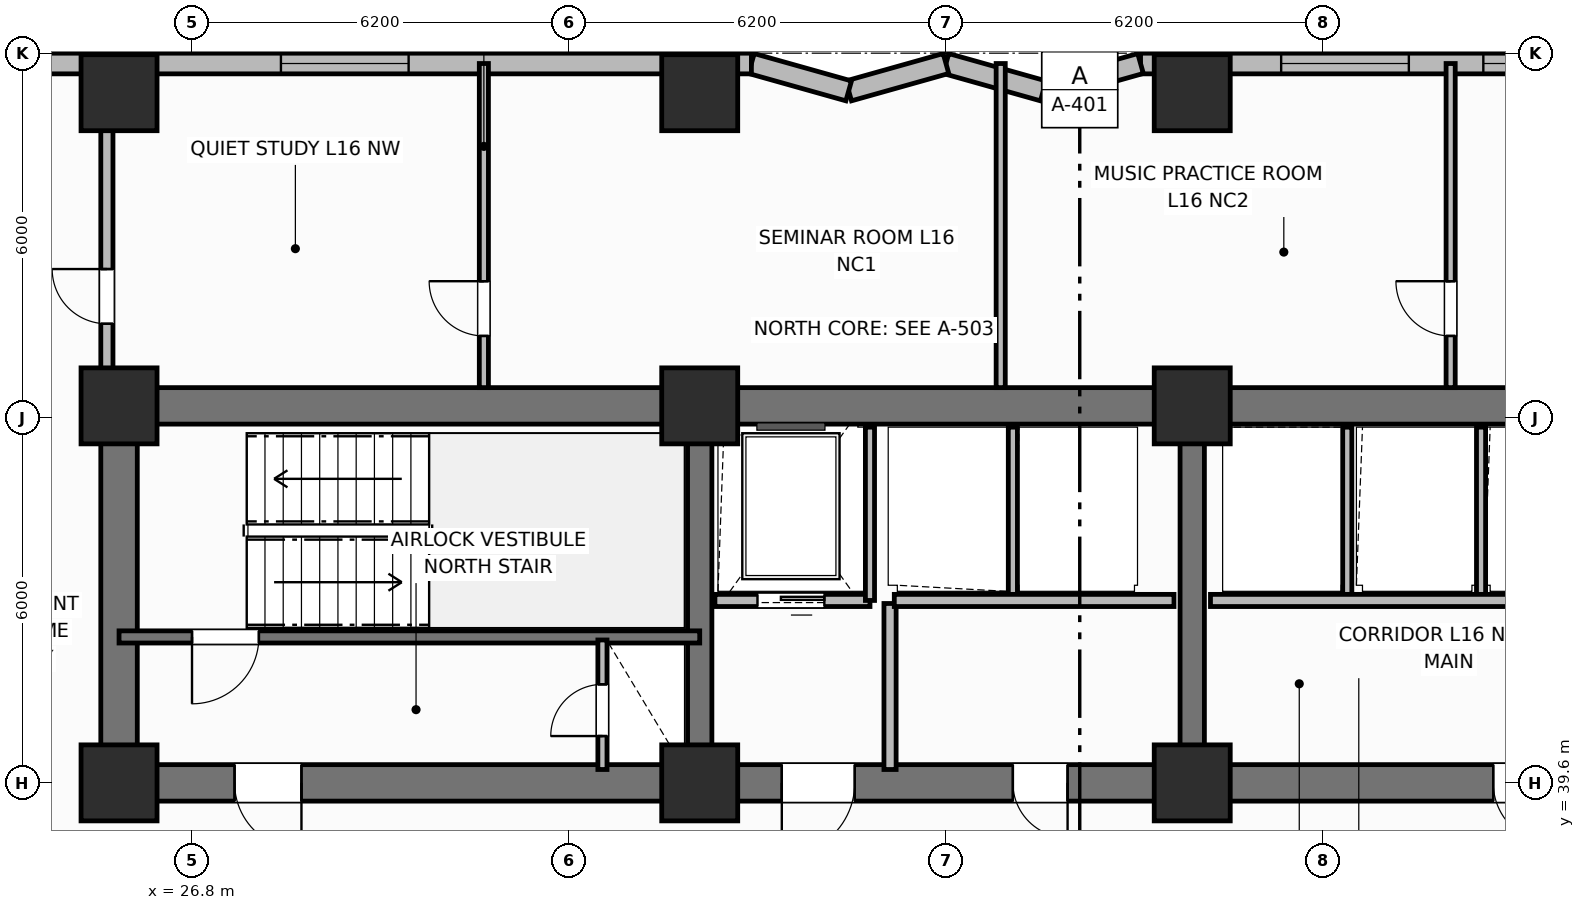
"""IFC4 building model, lengths in metres.
Left out: names, types, materials, properties, quantities, classifications, styles, units other than length and angle.
Written with IfcOpenShell. Run it as: python <this file> out.ifc"""

import sys

from ifc_helpers import new_model, si_unit, direction, frame, frame_2d, origin, origin_2d, place, context, subcontext, project, spatial, rectangle, extrude, element, fill, save


model = new_model("IFC4")
c1 = context("Model", 3, precision=1e-05, world=origin(), true_north=direction((0.0, 1.0)))
c2 = subcontext(c1, "Body", "Model", "MODEL_VIEW")
j1 = project(units=[si_unit("LENGTHUNIT", "METRE"), si_unit("PLANEANGLEUNIT", "RADIAN")], contexts=[c1])
p1 = place(None, origin())
s1 = spatial("IfcSite", under=j1, at=p1, CompositionType="ELEMENT")
p2 = place(p1, origin())
s2 = spatial("IfcBuilding", under=s1, at=p2, CompositionType="ELEMENT")
p3 = place(p2, frame((0.0, 0.0, 65.8)))
s3 = spatial("IfcBuildingStorey", under=s2, at=p3, CompositionType="ELEMENT", Elevation=65.8)
p4 = place(p3, frame((25.6, 45.8, 0.0), z_axis=(0.0, 0.0, 1.0), x_axis=(1.0, 0.0, 0.0)))
e1 = element("IfcWall", 1, at=p4, inside=s3, PredefinedType="SHEAR", context=c2, shape_type="SweptSolid", body=[
    extrude(rectangle(XDim=27.2, YDim=0.6, at=frame_2d((13.6, 0.0))), origin(), (0.0, 0.0, 1.0), 3.7),
])
p5 = place(p3, frame((25.6, 39.9, 0.0), z_axis=(0.0, 0.0, 1.0), x_axis=(0.0, 1.0, 0.0)))
e2 = element("IfcWall", 2, at=p5, inside=s3, PredefinedType="SHEAR", context=c2, shape_type="SweptSolid", body=[
    extrude(rectangle(XDim=5.6, YDim=0.6, at=frame_2d((2.8, 0.0))), origin(), (0.0, 0.0, 1.0), 3.7),
])
p6 = place(p3, frame((52.8, 39.6, 0.0), z_axis=(0.0, 0.0, 1.0), x_axis=(-1.0, 0.0, 0.0)))
e3 = element("IfcWall", 3, at=p6, inside=s3, PredefinedType="SHEAR", context=c2, shape_type="SweptSolid", body=[
    extrude(rectangle(XDim=27.2, YDim=0.6, at=frame_2d((13.6, 0.0))), origin(), (0.0, 0.0, 1.0), 3.7),
])
p7 = place(p6, frame((24.2, 0.0, 0.0)))
e4 = element("IfcOpeningElement", 4, at=p7, cuts=e3, PredefinedType="OPENING", context=c2, shape_type="SweptSolid", body=[
    extrude(rectangle(XDim=1.1, YDim=2.15, at=frame_2d((0.55, 1.075))), frame((0.0, 0.31, 0.0), z_axis=(0.0, -1.0, 0.0), x_axis=(1.0, 0.0, 0.0)), (0.0, 0.0, 1.0), 0.62),
])
p8 = place(p6, frame((15.1, 0.0, 0.0)))
e5 = element("IfcOpeningElement", 5, at=p8, cuts=e3, PredefinedType="OPENING", context=c2, shape_type="SweptSolid", body=[
    extrude(rectangle(XDim=1.2, YDim=2.15, at=frame_2d((0.6, 1.075))), frame((0.0, 0.31, 0.0), z_axis=(0.0, -1.0, 0.0), x_axis=(1.0, 0.0, 0.0)), (0.0, 0.0, 1.0), 0.62),
])
p9 = place(p6, frame((11.6, 0.0, 0.0)))
e6 = element("IfcOpeningElement", 6, at=p9, cuts=e3, PredefinedType="OPENING", context=c2, shape_type="SweptSolid", body=[
    extrude(rectangle(XDim=0.9, YDim=2.1, at=frame_2d((0.45, 1.05))), frame((0.0, 0.31, 0.0), z_axis=(0.0, -1.0, 0.0), x_axis=(1.0, 0.0, 0.0)), (0.0, 0.0, 1.0), 0.62),
])
p10 = place(p6, frame((3.6, 0.0, 0.0)))
e7 = element("IfcOpeningElement", 7, at=p10, cuts=e3, PredefinedType="OPENING", context=c2, shape_type="SweptSolid", body=[
    extrude(rectangle(XDim=1.0, YDim=2.15, at=frame_2d((0.5, 1.075))), frame((0.0, 0.31, 0.0), z_axis=(0.0, -1.0, 0.0), x_axis=(1.0, 0.0, 0.0)), (0.0, 0.0, 1.0), 0.62),
])
for number, where, z_axis, x_axis in (
    (8, (35.15, 39.9, 0.0), (0.0, 0.0, 1.0), (0.0, 1.0, 0.0)),
    (9, (43.25, 39.9, 0.0), (0.0, 0.0, 1.0), (0.0, 1.0, 0.0)),
):
    element("IfcWall", number, at=place(p3, frame(where, z_axis=z_axis, x_axis=x_axis)), inside=s3, PredefinedType="SHEAR", context=c2, shape_type="SweptSolid", body=[
        extrude(rectangle(XDim=5.6, YDim=0.4, at=frame_2d((2.8, 0.0))), origin(), (0.0, 0.0, 1.0), 3.7),
    ])
for number, where, z_axis, x_axis in (
    (10, (25.6, 39.6, 0.0), (0.0, 0.0, 1.0), (1.0, 0.0, 0.0)),
    (11, (25.6, 45.8, 0.0), (0.0, 0.0, 1.0), (1.0, 0.0, 0.0)),
    (12, (35.15, 39.6, 0.0), (0.0, 0.0, 1.0), (1.0, 0.0, 0.0)),
    (13, (35.15, 45.8, 0.0), (0.0, 0.0, 1.0), (1.0, 0.0, 0.0)),
    (14, (43.25, 39.6, 0.0), (0.0, 0.0, 1.0), (1.0, 0.0, 0.0)),
    (15, (43.25, 45.8, 0.0), (0.0, 0.0, 1.0), (1.0, 0.0, 0.0)),
    (16, (25.6, 50.95, 0.0), (0.0, 0.0, 1.0), (1.0, 0.0, 0.0)),
    (17, (35.15, 50.95, 0.0), (0.0, 0.0, 1.0), (1.0, 0.0, 0.0)),
    (18, (43.25, 50.95, 0.0), (0.0, 0.0, 1.0), (1.0, 0.0, 0.0)),
):
    element("IfcColumn", number, at=place(p3, frame(where, z_axis=z_axis, x_axis=x_axis)), inside=s3, PredefinedType="COLUMN", context=c2, shape_type="SweptSolid", body=[
        extrude(rectangle(XDim=1.25, YDim=1.25, at=origin_2d()), origin(), (0.0, 0.0, 1.0), 3.7),
    ])
p11 = place(p3, frame((59.8, 51.43, 0.0), z_axis=(0.0, 0.0, 1.0), x_axis=(-1.0, 0.0, 0.0)))
e19 = element("IfcWall", 19, at=p11, inside=s3, PredefinedType="SOLIDWALL", context=c2, shape_type="SweptSolid", body=[
    extrude(rectangle(XDim=17.4, YDim=0.34, at=frame_2d((8.7, 0.0))), origin(), (0.0, 0.0, 1.0), 2.7),
])
p12 = place(p11, frame((1.613, 0.0, 0.68)))
e20 = element("IfcOpeningElement", 20, at=p12, cuts=e19, PredefinedType="OPENING", context=c2, shape_type="SweptSolid", body=[
    extrude(rectangle(XDim=2.1, YDim=1.9, at=frame_2d((1.05, 0.95))), frame((0.0, 0.18, 0.0), z_axis=(0.0, -1.0, 0.0), x_axis=(1.0, 0.0, 0.0)), (0.0, 0.0, 1.0), 0.36),
])
p13 = place(p11, frame((9.663, 0.0, 0.68)))
e21 = element("IfcOpeningElement", 21, at=p13, cuts=e19, PredefinedType="OPENING", context=c2, shape_type="SweptSolid", body=[
    extrude(rectangle(XDim=2.1, YDim=1.9, at=frame_2d((1.05, 0.95))), frame((0.0, 0.18, 0.0), z_axis=(0.0, -1.0, 0.0), x_axis=(1.0, 0.0, 0.0)), (0.0, 0.0, 1.0), 0.36),
])
p14 = place(p11, frame((12.988, 0.0, 0.68)))
e22 = element("IfcOpeningElement", 22, at=p14, cuts=e19, PredefinedType="OPENING", context=c2, shape_type="SweptSolid", body=[
    extrude(rectangle(XDim=2.1, YDim=1.9, at=frame_2d((1.05, 0.95))), frame((0.0, 0.18, 0.0), z_axis=(0.0, -1.0, 0.0), x_axis=(1.0, 0.0, 0.0)), (0.0, 0.0, 1.0), 0.36),
])
p15 = place(p3, frame((42.4, 51.43, 0.0), z_axis=(0.0, 0.0, 1.0), x_axis=(-0.962652136636, -0.270741322725, 0.0)))
e23 = element("IfcWall", 23, at=p15, inside=s3, PredefinedType="SOLIDWALL", context=c2, shape_type="SweptSolid", body=[
    extrude(rectangle(XDim=1.662, YDim=0.34, at=frame_2d((0.831, 0.0))), origin(), (0.0, 0.0, 1.0), 2.7),
])
p16 = place(p3, frame((40.8, 50.98, 0.0), z_axis=(0.0, 0.0, 1.0), x_axis=(-0.962662902433, 0.270703040766, 0.0)))
e24 = element("IfcWall", 24, at=p16, inside=s3, PredefinedType="SOLIDWALL", context=c2, shape_type="SweptSolid", body=[
    extrude(rectangle(XDim=1.662, YDim=0.34, at=frame_2d((0.831, 0.0))), origin(), (0.0, 0.0, 1.0), 2.7),
])
p17 = place(p3, frame((39.2, 51.43, 0.0), z_axis=(0.0, 0.0, 1.0), x_axis=(-0.962652136636, -0.270741322725, 0.0)))
e25 = element("IfcWall", 25, at=p17, inside=s3, PredefinedType="SOLIDWALL", context=c2, shape_type="SweptSolid", body=[
    extrude(rectangle(XDim=1.662, YDim=0.34, at=frame_2d((0.831, 0.0))), origin(), (0.0, 0.0, 1.0), 2.7),
])
p18 = place(p3, frame((37.6, 50.98, 0.0), z_axis=(0.0, 0.0, 1.0), x_axis=(-0.962662902433, 0.270703040766, 0.0)))
e26 = element("IfcWall", 26, at=p18, inside=s3, PredefinedType="SOLIDWALL", context=c2, shape_type="SweptSolid", body=[
    extrude(rectangle(XDim=1.662, YDim=0.34, at=frame_2d((0.831, 0.0))), origin(), (0.0, 0.0, 1.0), 2.7),
])
p19 = place(p3, frame((36.0, 51.43, 0.0), z_axis=(0.0, 0.0, 1.0), x_axis=(-1.0, 0.0, 0.0)))
e27 = element("IfcWall", 27, at=p19, inside=s3, PredefinedType="SOLIDWALL", context=c2, shape_type="SweptSolid", body=[
    extrude(rectangle(XDim=17.4, YDim=0.34, at=frame_2d((8.7, 0.0))), origin(), (0.0, 0.0, 1.0), 2.7),
])
p20 = place(p19, frame((5.637, 0.0, 0.68)))
e28 = element("IfcOpeningElement", 28, at=p20, cuts=e27, PredefinedType="OPENING", context=c2, shape_type="SweptSolid", body=[
    extrude(rectangle(XDim=2.1, YDim=1.9, at=frame_2d((1.05, 0.95))), frame((0.0, 0.18, 0.0), z_axis=(0.0, -1.0, 0.0), x_axis=(1.0, 0.0, 0.0)), (0.0, 0.0, 1.0), 0.36),
])
p21 = place(p19, frame((14.038, 0.0, 0.68)))
e29 = element("IfcOpeningElement", 29, at=p21, cuts=e27, PredefinedType="OPENING", context=c2, shape_type="SweptSolid", body=[
    extrude(rectangle(XDim=2.1, YDim=1.9, at=frame_2d((1.05, 0.95))), frame((0.0, 0.18, 0.0), z_axis=(0.0, -1.0, 0.0), x_axis=(1.0, 0.0, 0.0)), (0.0, 0.0, 1.0), 0.36),
])
p22 = place(p3, frame((35.15, 42.0, 0.0), z_axis=(0.0, 0.0, 1.0), x_axis=(-1.0, 0.0, 0.0)))
e30 = element("IfcWall", 30, at=p22, inside=s3, PredefinedType="SHEAR", context=c2, shape_type="SweptSolid", body=[
    extrude(rectangle(XDim=9.55, YDim=0.2, at=frame_2d((4.775, 0.0))), origin(), (0.0, 0.0, 1.0), 3.7),
])
p23 = place(p22, frame((7.25, 0.0, 0.0)))
e31 = element("IfcOpeningElement", 31, at=p23, cuts=e30, PredefinedType="OPENING", context=c2, shape_type="SweptSolid", body=[
    extrude(rectangle(XDim=1.1, YDim=2.15, at=frame_2d((0.55, 1.075))), frame((0.0, 0.11, 0.0), z_axis=(0.0, -1.0, 0.0), x_axis=(1.0, 0.0, 0.0)), (0.0, 0.0, 1.0), 0.22),
])
p24 = place(p3, frame((33.55, 39.82, 0.0), z_axis=(0.0, 0.0, 1.0), x_axis=(0.0, 1.0, 0.0)))
e32 = element("IfcWall", 32, at=p24, inside=s3, PredefinedType="PARTITIONING", context=c2, shape_type="SweptSolid", body=[
    extrude(rectangle(XDim=2.13, YDim=0.15, at=frame_2d((1.065, 0.0))), origin(), (0.0, 0.0, 1.0), 2.53),
])
p25 = place(p24, frame((0.55, 0.0, 0.0)))
e33 = element("IfcOpeningElement", 33, at=p25, cuts=e32, PredefinedType="OPENING", context=c2, shape_type="SweptSolid", body=[
    extrude(rectangle(XDim=0.85, YDim=2.05, at=frame_2d((0.425, 1.025))), frame((0.0, 0.085, 0.0), z_axis=(0.0, -1.0, 0.0), x_axis=(1.0, 0.0, 0.0)), (0.0, 0.0, 1.0), 0.17),
])
p26 = place(p3, frame((37.95, 42.6, 0.0), z_axis=(0.0, 0.0, 1.0), x_axis=(-1.0, 0.0, 0.0)))
e34 = element("IfcWall", 34, at=p26, inside=s3, PredefinedType="PARTITIONING", context=c2, shape_type="SweptSolid", body=[
    extrude(rectangle(XDim=2.55, YDim=0.2, at=frame_2d((1.275, 0.0))), origin(), (0.0, 0.0, 1.0), 2.3),
])
p27 = place(p26, frame((0.75, 0.0, 0.0)))
e35 = element("IfcOpeningElement", 35, at=p27, cuts=e34, PredefinedType="OPENING", context=c2, shape_type="SweptSolid", body=[
    extrude(rectangle(XDim=1.1, YDim=2.15, at=frame_2d((0.55, 1.075))), frame((0.0, 0.11, 0.0), z_axis=(0.0, -1.0, 0.0), x_axis=(1.0, 0.0, 0.0)), (0.0, 0.0, 1.0), 0.22),
])
p28 = place(p3, frame((37.95, 42.6, 0.0), z_axis=(0.0, 0.0, 1.0), x_axis=(0.0, 1.0, 0.0)))
e36 = element("IfcWall", 36, at=p28, inside=s3, PredefinedType="PARTITIONING", context=c2, shape_type="SweptSolid", body=[
    extrude(rectangle(XDim=2.85, YDim=0.15, at=frame_2d((1.425, 0.0))), origin(), (0.0, 0.0, 1.0), 2.53),
])
p29 = place(p3, frame((38.28, 39.82, 0.0), z_axis=(0.0, 0.0, 1.0), x_axis=(0.0, 1.0, 0.0)))
e37 = element("IfcWall", 37, at=p29, inside=s3, PredefinedType="PARTITIONING", context=c2, shape_type="SweptSolid", body=[
    extrude(rectangle(XDim=2.73, YDim=0.2, at=frame_2d((1.365, 0.0))), origin(), (0.0, 0.0, 1.0), 2.53),
])
p30 = place(p3, frame((40.3, 42.65, 0.0), z_axis=(0.0, 0.0, 1.0), x_axis=(0.0, 1.0, 0.0)))
e38 = element("IfcWall", 38, at=p30, inside=s3, PredefinedType="PARTITIONING", context=c2, shape_type="SweptSolid", body=[
    extrude(rectangle(XDim=2.8, YDim=0.15, at=frame_2d((1.4, 0.0))), origin(), (0.0, 0.0, 1.0), 2.53),
])
p31 = place(p3, frame((42.95, 42.6, 0.0), z_axis=(0.0, 0.0, 1.0), x_axis=(-1.0, 0.0, 0.0)))
e39 = element("IfcWall", 39, at=p31, inside=s3, PredefinedType="PARTITIONING", context=c2, shape_type="SweptSolid", body=[
    extrude(rectangle(XDim=4.6, YDim=0.2, at=frame_2d((2.3, 0.0))), origin(), (0.0, 0.0, 1.0), 2.3),
])
for number, where, z_axis, x_axis in (
    (40, (45.8, 42.65, 0.0), (0.0, 0.0, 1.0), (0.0, 1.0, 0.0)),
    (41, (48.0, 42.65, 0.0), (0.0, 0.0, 1.0), (0.0, 1.0, 0.0)),
):
    element("IfcWall", number, at=place(p3, frame(where, z_axis=z_axis, x_axis=x_axis)), inside=s3, PredefinedType="PARTITIONING", context=c2, shape_type="SweptSolid", body=[
        extrude(rectangle(XDim=2.8, YDim=0.15, at=frame_2d((1.4, 0.0))), origin(), (0.0, 0.0, 1.0), 2.53),
    ])
p32 = place(p3, frame((52.35, 42.6, 0.0), z_axis=(0.0, 0.0, 1.0), x_axis=(-1.0, 0.0, 0.0)))
e42 = element("IfcWall", 42, at=p32, inside=s3, PredefinedType="PARTITIONING", context=c2, shape_type="SweptSolid", body=[
    extrude(rectangle(XDim=8.8, YDim=0.2, at=frame_2d((4.4, 0.0))), origin(), (0.0, 0.0, 1.0), 2.53),
])
p33 = place(p3, frame((31.6, 46.1, 0.0), z_axis=(0.0, 0.0, 1.0), x_axis=(0.0, 1.0, 0.0)))
e43 = element("IfcWall", 43, at=p33, inside=s3, PredefinedType="PARTITIONING", context=c2, shape_type="SweptSolid", body=[
    extrude(rectangle(XDim=5.33, YDim=0.15, at=frame_2d((2.665, 0.0))), origin(), (0.0, 0.0, 1.0), 2.53),
])
p34 = place(p33, frame((0.85, 0.0, 0.0)))
e44 = element("IfcOpeningElement", 44, at=p34, cuts=e43, PredefinedType="OPENING", context=c2, shape_type="SweptSolid", body=[
    extrude(rectangle(XDim=0.9, YDim=2.1, at=frame_2d((0.45, 1.05))), frame((0.0, 0.085, 0.0), z_axis=(0.0, -1.0, 0.0), x_axis=(1.0, 0.0, 0.0)), (0.0, 0.0, 1.0), 0.17),
])
p35 = place(p3, frame((40.1, 46.1, 0.0), z_axis=(0.0, 0.0, 1.0), x_axis=(0.0, 1.0, 0.0)))
e45 = element("IfcWall", 45, at=p35, inside=s3, PredefinedType="PARTITIONING", context=c2, shape_type="SweptSolid", body=[
    extrude(rectangle(XDim=5.33, YDim=0.15, at=frame_2d((2.665, 0.0))), origin(), (0.0, 0.0, 1.0), 2.53),
])
p36 = place(p3, frame((47.5, 46.1, 0.0), z_axis=(0.0, 0.0, 1.0), x_axis=(0.0, 1.0, 0.0)))
e46 = element("IfcWall", 46, at=p36, inside=s3, PredefinedType="PARTITIONING", context=c2, shape_type="SweptSolid", body=[
    extrude(rectangle(XDim=5.33, YDim=0.15, at=frame_2d((2.665, 0.0))), origin(), (0.0, 0.0, 1.0), 2.53),
])
p37 = place(p36, frame((0.85, 0.0, 0.0)))
e47 = element("IfcOpeningElement", 47, at=p37, cuts=e46, PredefinedType="OPENING", context=c2, shape_type="SweptSolid", body=[
    extrude(rectangle(XDim=0.9, YDim=2.1, at=frame_2d((0.45, 1.05))), frame((0.0, 0.085, 0.0), z_axis=(0.0, -1.0, 0.0), x_axis=(1.0, 0.0, 0.0)), (0.0, 0.0, 1.0), 0.17),
])
p38 = place(p3, frame((25.4, 46.1, 0.0), z_axis=(0.0, 0.0, 1.0), x_axis=(0.0, 1.0, 0.0)))
e48 = element("IfcWall", 48, at=p38, inside=s3, PredefinedType="PARTITIONING", context=c2, shape_type="SweptSolid", body=[
    extrude(rectangle(XDim=4.58, YDim=0.2, at=frame_2d((2.29, 0.0))), origin(), (0.0, 0.0, 1.0), 2.53),
])
p39 = place(p38, frame((1.05, 0.0, 0.0)))
e49 = element("IfcOpeningElement", 49, at=p39, cuts=e48, PredefinedType="OPENING", context=c2, shape_type="SweptSolid", body=[
    extrude(rectangle(XDim=0.9, YDim=2.1, at=frame_2d((0.45, 1.05))), frame((0.0, 0.11, 0.0), z_axis=(0.0, -1.0, 0.0), x_axis=(1.0, 0.0, 0.0)), (0.0, 0.0, 1.0), 0.22),
])
p40 = place(p13, origin())
e50 = element("IfcWindow", 50, at=p40, inside=s3, PartitioningType="SINGLE_PANEL", PredefinedType="WINDOW", context=c2, shape_type="SweptSolid", body=[
    extrude(rectangle(XDim=2.1, YDim=1.9, at=frame_2d((1.05, 0.95))), frame((0.0, 0.03, 0.0), z_axis=(0.0, -1.0, 0.0), x_axis=(1.0, 0.0, 0.0)), (0.0, 0.0, 1.0), 0.06),
])
fill(e21, e50)
p41 = place(p14, origin())
e51 = element("IfcWindow", 51, at=p41, inside=s3, PartitioningType="SINGLE_PANEL", PredefinedType="WINDOW", context=c2, shape_type="SweptSolid", body=[
    extrude(rectangle(XDim=2.1, YDim=1.9, at=frame_2d((1.05, 0.95))), frame((0.0, 0.03, 0.0), z_axis=(0.0, -1.0, 0.0), x_axis=(1.0, 0.0, 0.0)), (0.0, 0.0, 1.0), 0.06),
])
fill(e22, e51)
p42 = place(p20, origin())
e52 = element("IfcWindow", 52, at=p42, inside=s3, PartitioningType="SINGLE_PANEL", PredefinedType="WINDOW", context=c2, shape_type="SweptSolid", body=[
    extrude(rectangle(XDim=2.1, YDim=1.9, at=frame_2d((1.05, 0.95))), frame((0.0, 0.03, 0.0), z_axis=(0.0, -1.0, 0.0), x_axis=(1.0, 0.0, 0.0)), (0.0, 0.0, 1.0), 0.06),
])
fill(e28, e52)
p43 = place(p23, origin())
e53 = element("IfcDoor", 53, at=p43, inside=s3, OperationType="SINGLE_SWING_RIGHT", PredefinedType="DOOR", context=c2, shape_type="SweptSolid", body=[
    extrude(rectangle(XDim=1.1, YDim=2.15, at=frame_2d((0.55, 1.075))), frame((0.0, 0.025, 0.0), z_axis=(0.0, -1.0, 0.0), x_axis=(1.0, 0.0, 0.0)), (0.0, 0.0, 1.0), 0.05),
])
fill(e31, e53)
p44 = place(p25, origin())
e54 = element("IfcDoor", 54, at=p44, inside=s3, OperationType="SINGLE_SWING_LEFT", PredefinedType="TRAPDOOR", context=c2, shape_type="SweptSolid", body=[
    extrude(rectangle(XDim=0.85, YDim=2.05, at=frame_2d((0.425, 1.025))), frame((0.0, 0.025, 0.0), z_axis=(0.0, -1.0, 0.0), x_axis=(1.0, 0.0, 0.0)), (0.0, 0.0, 1.0), 0.05),
])
fill(e33, e54)
p45 = place(p27, origin())
e55 = element("IfcDoor", 55, at=p45, inside=s3, OperationType="SLIDING_TO_LEFT", PredefinedType="DOOR", context=c2, shape_type="SweptSolid", body=[
    extrude(rectangle(XDim=1.1, YDim=2.15, at=frame_2d((0.55, 1.075))), frame((0.0, 0.025, 0.0), z_axis=(0.0, -1.0, 0.0), x_axis=(1.0, 0.0, 0.0)), (0.0, 0.0, 1.0), 0.05),
])
fill(e35, e55)
p46 = place(p34, origin())
e56 = element("IfcDoor", 56, at=p46, inside=s3, OperationType="SINGLE_SWING_RIGHT", PredefinedType="DOOR", context=c2, shape_type="SweptSolid", body=[
    extrude(rectangle(XDim=0.9, YDim=2.1, at=frame_2d((0.45, 1.05))), frame((0.0, 0.025, 0.0), z_axis=(0.0, -1.0, 0.0), x_axis=(1.0, 0.0, 0.0)), (0.0, 0.0, 1.0), 0.05),
])
fill(e44, e56)
p47 = place(p37, origin())
e57 = element("IfcDoor", 57, at=p47, inside=s3, OperationType="SINGLE_SWING_RIGHT", PredefinedType="DOOR", context=c2, shape_type="SweptSolid", body=[
    extrude(rectangle(XDim=0.9, YDim=2.1, at=frame_2d((0.45, 1.05))), frame((0.0, 0.025, 0.0), z_axis=(0.0, -1.0, 0.0), x_axis=(1.0, 0.0, 0.0)), (0.0, 0.0, 1.0), 0.05),
])
fill(e47, e57)
p48 = place(p39, origin())
e58 = element("IfcDoor", 58, at=p48, inside=s3, OperationType="SINGLE_SWING_RIGHT", PredefinedType="DOOR", context=c2, shape_type="SweptSolid", body=[
    extrude(rectangle(XDim=0.9, YDim=2.1, at=frame_2d((0.45, 1.05))), frame((0.0, 0.025, 0.0), z_axis=(0.0, -1.0, 0.0), x_axis=(1.0, 0.0, 0.0)), (0.0, 0.0, 1.0), 0.05),
])
fill(e49, e58)
p49 = place(p7, origin())
e59 = element("IfcDoor", 59, at=p49, inside=s3, OperationType="SINGLE_SWING_LEFT", PredefinedType="DOOR", context=c2, shape_type="SweptSolid", body=[
    extrude(rectangle(XDim=1.1, YDim=2.15, at=frame_2d((0.55, 1.075))), frame((0.0, 0.025, 0.0), z_axis=(0.0, -1.0, 0.0), x_axis=(1.0, 0.0, 0.0)), (0.0, 0.0, 1.0), 0.05),
])
fill(e4, e59)
p50 = place(p8, origin())
e60 = element("IfcDoor", 60, at=p50, inside=s3, OperationType="SINGLE_SWING_RIGHT", PredefinedType="DOOR", context=c2, shape_type="SweptSolid", body=[
    extrude(rectangle(XDim=1.2, YDim=2.15, at=frame_2d((0.6, 1.075))), frame((0.0, 0.025, 0.0), z_axis=(0.0, -1.0, 0.0), x_axis=(1.0, 0.0, 0.0)), (0.0, 0.0, 1.0), 0.05),
])
fill(e5, e60)
p51 = place(p9, origin())
e61 = element("IfcDoor", 61, at=p51, inside=s3, OperationType="SINGLE_SWING_LEFT", PredefinedType="DOOR", context=c2, shape_type="SweptSolid", body=[
    extrude(rectangle(XDim=0.9, YDim=2.1, at=frame_2d((0.45, 1.05))), frame((0.0, 0.025, 0.0), z_axis=(0.0, -1.0, 0.0), x_axis=(1.0, 0.0, 0.0)), (0.0, 0.0, 1.0), 0.05),
])
fill(e6, e61)
p52 = place(p10, origin())
e62 = element("IfcDoor", 62, at=p52, inside=s3, OperationType="SINGLE_SWING_LEFT", PredefinedType="DOOR", context=c2, shape_type="SweptSolid", body=[
    extrude(rectangle(XDim=1.0, YDim=2.15, at=frame_2d((0.5, 1.075))), frame((0.0, 0.025, 0.0), z_axis=(0.0, -1.0, 0.0), x_axis=(1.0, 0.0, 0.0)), (0.0, 0.0, 1.0), 0.05),
])
fill(e7, e62)
save(model, sys.argv[1])
